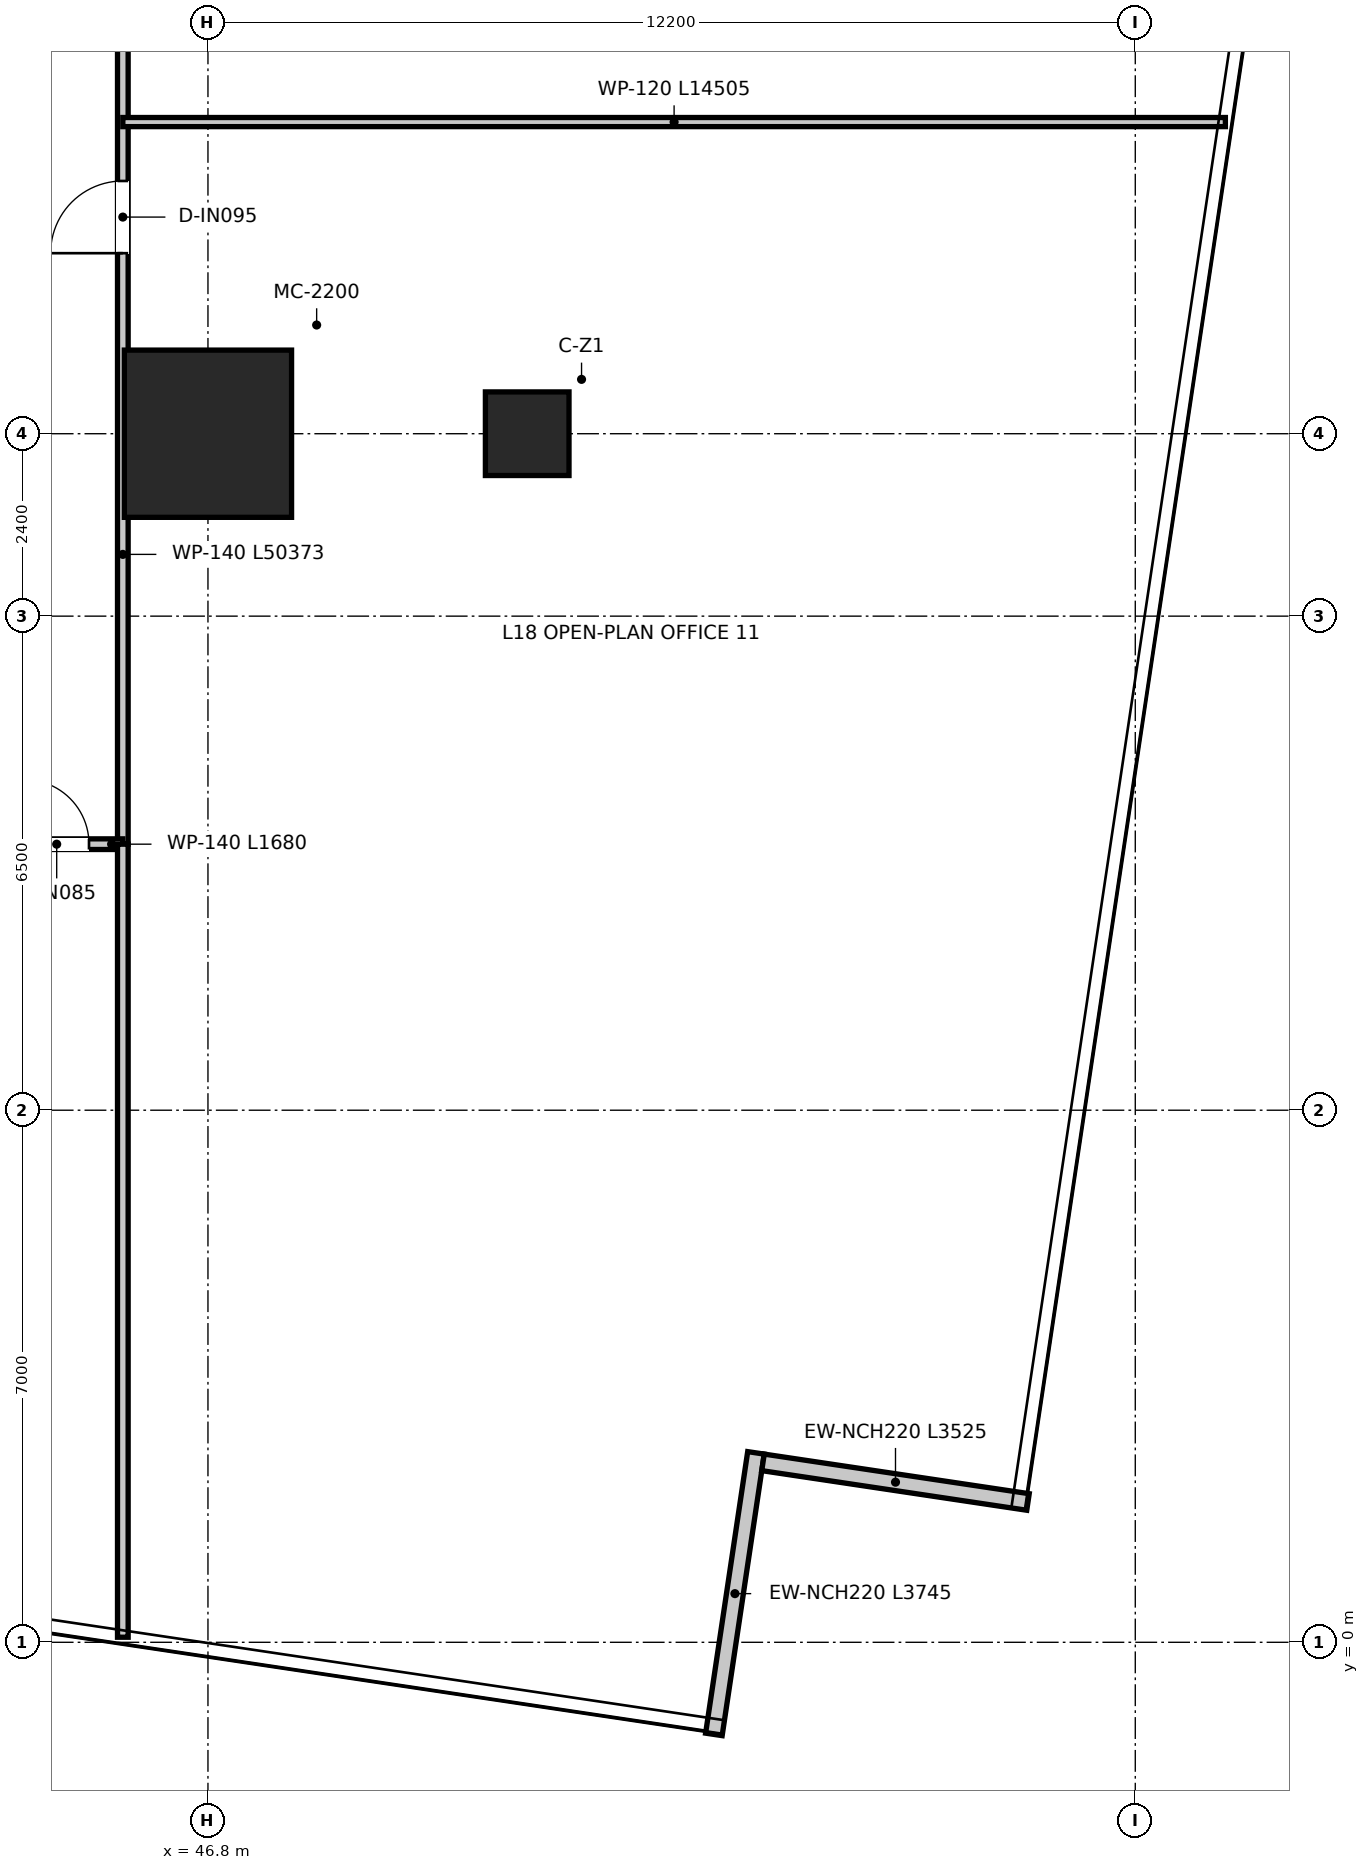
"""IFC4 building model, lengths in metres.
Left out: names, types, materials, properties, quantities, classifications, styles, units other than length and angle.
Written with IfcOpenShell. Run it as: python <this file> out.ifc"""

import sys

from ifc_helpers import new_model, si_unit, direction, frame, frame_2d, origin, origin_2d, place, context, subcontext, project, spatial, rectangle, extrude, source, transform, mapped, element, fill, save


model = new_model("IFC4")
c1 = context("Model", 3, precision=1e-05, world=origin(), true_north=direction((0.0, 1.0)))
c2 = subcontext(c1, "Body", "Model", "MODEL_VIEW")
j1 = project(units=[si_unit("LENGTHUNIT", "METRE"), si_unit("PLANEANGLEUNIT", "RADIAN")], contexts=[c1])
p1 = place(None, origin())
s1 = spatial("IfcSite", under=j1, at=p1, CompositionType="ELEMENT")
p2 = place(p1, origin())
s2 = spatial("IfcBuilding", under=s1, at=p2, CompositionType="ELEMENT")
p3 = place(p2, frame((0.0, 0.0, 76.35)))
s3 = spatial("IfcBuildingStorey", under=s2, at=p3, CompositionType="ELEMENT", Elevation=76.35)
m1 = source(origin(), c2, "Body", "SweptSolid", [
    extrude(rectangle(XDim=2.2, YDim=2.2, at=origin_2d()), origin(), (0.0, 0.0, 1.0), 3.95),
])
p4 = place(p3, frame((46.8, 15.9, 0.0), z_axis=(0.0, 0.0, 1.0), x_axis=(1.0, 0.0, 0.0)))
e1 = element("IfcColumn", 1, at=p4, inside=s3, PredefinedType="USERDEFINED", context=c2, shape_type="MappedRepresentation", body=[
    mapped(m1, transform((0.0, 0.0, 0.0), x_axis=(1.0, 0.0, 0.0), y_axis=(0.0, 1.0, 0.0), z_axis=(0.0, 0.0, 1.0), scale=1.0)),
])
m2 = source(origin(), c2, "Body", "SweptSolid", [
    extrude(rectangle(XDim=1.1, YDim=1.1, at=origin_2d()), origin(), (0.0, 0.0, 1.0), 3.95),
])
p5 = place(p3, frame((51.0, 15.9, 0.0), z_axis=(0.0, 0.0, 1.0), x_axis=(1.0, 0.0, 0.0)))
e2 = element("IfcColumn", 2, at=p5, inside=s3, PredefinedType="COLUMN", context=c2, shape_type="MappedRepresentation", body=[
    mapped(m2, transform((0.0, 0.0, 0.0), x_axis=(1.0, 0.0, 0.0), y_axis=(0.0, 1.0, 0.0), z_axis=(0.0, 0.0, 1.0), scale=1.0)),
])
p6 = place(p3, frame((53.456, -1.212, 0.0), z_axis=(0.0, 0.0, 1.0), x_axis=(0.147852699435, 0.989009392913, 0.0)))
e3 = element("IfcWall", 3, at=p6, inside=s3, PredefinedType="ELEMENTEDWALL", context=c2, shape_type="SweptSolid", body=[
    extrude(rectangle(XDim=3.745, YDim=0.22, at=frame_2d((1.873, 0.0))), origin(), (0.0, 0.0, 1.0), 3.59),
])
p7 = place(p3, frame((54.102, 2.367, 0.0), z_axis=(0.0, 0.0, 1.0), x_axis=(0.989015973204, -0.147808676155, 0.0)))
e4 = element("IfcWall", 4, at=p7, inside=s3, PredefinedType="ELEMENTEDWALL", context=c2, shape_type="SweptSolid", body=[
    extrude(rectangle(XDim=3.525, YDim=0.22, at=frame_2d((1.762, 0.0))), origin(), (0.0, 0.0, 1.0), 3.59),
])
p8 = place(p3, frame((45.68, 10.5, 0.0), z_axis=(0.0, 0.0, 1.0), x_axis=(0.0, 1.0, 0.0)))
e5 = element("IfcWall", 5, at=p8, inside=s3, PredefinedType="PARTITIONING", context=c2, shape_type="SweptSolid", body=[
    extrude(rectangle(XDim=25.62, YDim=0.14, at=frame_2d((12.81, 0.0))), origin(), (0.0, 0.0, 1.0), 2.89),
])
p9 = place(p8, frame((7.775, 0.0, 0.0)))
e6 = element("IfcOpeningElement", 6, at=p9, cuts=e5, PredefinedType="OPENING", context=c2, shape_type="SweptSolid", body=[
    extrude(rectangle(XDim=0.95, YDim=2.1, at=frame_2d((0.475, 1.05))), frame((0.0, 0.08, 0.0), z_axis=(0.0, -1.0, 0.0), x_axis=(1.0, 0.0, 0.0)), (0.0, 0.0, 1.0), 0.16),
])
p10 = place(p8, frame((11.275, 0.0, 0.0)))
e7 = element("IfcOpeningElement", 7, at=p10, cuts=e5, PredefinedType="OPENING", context=c2, shape_type="SweptSolid", body=[
    extrude(rectangle(XDim=0.95, YDim=2.1, at=frame_2d((0.475, 1.05))), frame((0.0, 0.08, 0.0), z_axis=(0.0, -1.0, 0.0), x_axis=(1.0, 0.0, 0.0)), (0.0, 0.0, 1.0), 0.16),
])
p11 = place(p8, frame((15.775, 0.0, 0.0)))
e8 = element("IfcOpeningElement", 8, at=p11, cuts=e5, PredefinedType="OPENING", context=c2, shape_type="SweptSolid", body=[
    extrude(rectangle(XDim=0.95, YDim=2.1, at=frame_2d((0.475, 1.05))), frame((0.0, 0.08, 0.0), z_axis=(0.0, -1.0, 0.0), x_axis=(1.0, 0.0, 0.0)), (0.0, 0.0, 1.0), 0.16),
])
p12 = place(p8, frame((20.125, 0.0, 0.0)))
e9 = element("IfcOpeningElement", 9, at=p12, cuts=e5, PredefinedType="OPENING", context=c2, shape_type="SweptSolid", body=[
    extrude(rectangle(XDim=0.95, YDim=2.1, at=frame_2d((0.475, 1.05))), frame((0.0, 0.08, 0.0), z_axis=(0.0, -1.0, 0.0), x_axis=(1.0, 0.0, 0.0)), (0.0, 0.0, 1.0), 0.16),
])
p13 = place(p8, frame((22.975, 0.0, 0.0)))
e10 = element("IfcOpeningElement", 10, at=p13, cuts=e5, PredefinedType="OPENING", context=c2, shape_type="SweptSolid", body=[
    extrude(rectangle(XDim=0.95, YDim=2.1, at=frame_2d((0.475, 1.05))), frame((0.0, 0.08, 0.0), z_axis=(0.0, -1.0, 0.0), x_axis=(1.0, 0.0, 0.0)), (0.0, 0.0, 1.0), 0.16),
])
p14 = place(p3, frame((44.0, 10.5, 0.0), z_axis=(0.0, 0.0, 1.0), x_axis=(1.0, 0.0, 0.0)))
e11 = element("IfcWall", 11, at=p14, inside=s3, PredefinedType="PARTITIONING", context=c2, shape_type="SweptSolid", body=[
    extrude(rectangle(XDim=1.68, YDim=0.14, at=frame_2d((0.84, 0.0))), origin(), (0.0, 0.0, 1.0), 3.59),
])
p15 = place(p14, frame((0.385, 0.0, 0.0)))
e12 = element("IfcOpeningElement", 12, at=p15, cuts=e11, PredefinedType="OPENING", context=c2, shape_type="SweptSolid", body=[
    extrude(rectangle(XDim=0.85, YDim=2.1, at=frame_2d((0.425, 1.05))), frame((0.0, 0.08, 0.0), z_axis=(0.0, -1.0, 0.0), x_axis=(1.0, 0.0, 0.0)), (0.0, 0.0, 1.0), 0.16),
])
p16 = place(p3, frame((45.68, 0.067, 0.0), z_axis=(0.0, 0.0, 1.0), x_axis=(0.0, 1.0, 0.0)))
e13 = element("IfcWall", 13, at=p16, inside=s3, PredefinedType="PARTITIONING", context=c2, shape_type="SweptSolid", body=[
    extrude(rectangle(XDim=10.433, YDim=0.14, at=frame_2d((5.217, 0.0))), origin(), (0.0, 0.0, 1.0), 3.59),
])
p17 = place(p3, frame((45.68, 20.0, 0.0), z_axis=(0.0, 0.0, 1.0), x_axis=(1.0, 0.0, 0.0)))
e14 = element("IfcWall", 14, at=p17, inside=s3, PredefinedType="PARTITIONING", context=c2, shape_type="SweptSolid", body=[
    extrude(rectangle(XDim=14.505, YDim=0.12, at=frame_2d((7.253, 0.0))), origin(), (0.0, 0.0, 1.0), 2.89),
])
p18 = place(p9, origin())
e15 = element("IfcDoor", 15, at=p18, inside=s3, OperationType="SINGLE_SWING_LEFT", PredefinedType="DOOR", context=c2, shape_type="SweptSolid", body=[
    extrude(rectangle(XDim=0.95, YDim=2.1, at=frame_2d((0.475, 1.05))), frame((0.0, 0.025, 0.0), z_axis=(0.0, -1.0, 0.0), x_axis=(1.0, 0.0, 0.0)), (0.0, 0.0, 1.0), 0.05),
])
fill(e6, e15)
p19 = place(p15, origin())
e16 = element("IfcDoor", 16, at=p19, inside=s3, OperationType="SINGLE_SWING_LEFT", PredefinedType="DOOR", context=c2, shape_type="SweptSolid", body=[
    extrude(rectangle(XDim=0.85, YDim=2.1, at=frame_2d((0.425, 1.05))), frame((0.0, 0.025, 0.0), z_axis=(0.0, -1.0, 0.0), x_axis=(1.0, 0.0, 0.0)), (0.0, 0.0, 1.0), 0.05),
])
fill(e12, e16)
save(model, sys.argv[1])
